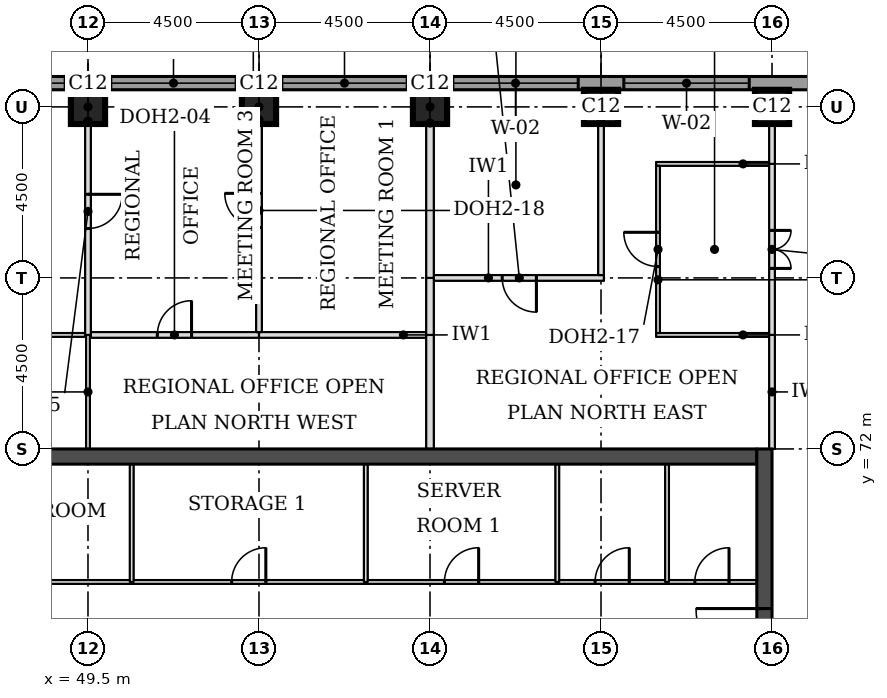
"""IFC4 building model, lengths in metres.
Left out: names, types, materials, properties, quantities, classifications, styles, units other than length and angle.
Written with IfcOpenShell. Run it as: python <this file> out.ifc"""

import sys

from ifc_helpers import new_model, si_unit, direction, frame, frame_2d, origin, origin_2d, place, context, subcontext, project, spatial, rectangle, extrude, element, fill, save


model = new_model("IFC4")
c1 = context("Model", 3, precision=1e-05, world=origin(), true_north=direction((0.0, 1.0)))
c2 = subcontext(c1, "Body", "Model", "MODEL_VIEW")
j1 = project(units=[si_unit("LENGTHUNIT", "METRE"), si_unit("PLANEANGLEUNIT", "RADIAN")], contexts=[c1])
p1 = place(None, origin())
s1 = spatial("IfcSite", under=j1, at=p1, CompositionType="ELEMENT")
p2 = place(p1, origin())
s2 = spatial("IfcBuilding", under=s1, at=p2, CompositionType="ELEMENT")
p3 = place(p2, frame((0.0, 0.0, 155.1)))
s3 = spatial("IfcBuildingStorey", under=s2, at=p3, CompositionType="ELEMENT", Elevation=155.1)
for number, where, z_axis, x_axis in (
    (1, (49.5, 81.0, 0.0), (0.0, 0.0, 1.0), (1.0, 0.0, 0.0)),
    (2, (54.0, 81.0, 0.0), (0.0, 0.0, 1.0), (1.0, 0.0, 0.0)),
    (3, (58.5, 81.0, 0.0), (0.0, 0.0, 1.0), (1.0, 0.0, 0.0)),
    (4, (63.0, 81.0, 0.0), (0.0, 0.0, 1.0), (1.0, 0.0, 0.0)),
    (5, (67.5, 81.0, 0.0), (0.0, 0.0, 1.0), (1.0, 0.0, 0.0)),
):
    element("IfcColumn", number, at=place(p3, frame(where, z_axis=z_axis, x_axis=x_axis)), inside=s3, PredefinedType="COLUMN", context=c2, shape_type="SweptSolid", body=[
        extrude(rectangle(XDim=0.9, YDim=0.9, at=origin_2d()), origin(), (0.0, 0.0, 1.0), 3.7),
    ])
p4 = place(p3, frame((45.4, 71.8, 0.0), z_axis=(0.0, 0.0, 1.0), x_axis=(1.0, 0.0, 0.0)))
e6 = element("IfcWall", 6, at=p4, inside=s3, PredefinedType="SHEAR", context=c2, shape_type="SweptSolid", body=[
    extrude(rectangle(XDim=21.7, YDim=0.4, at=frame_2d((10.85, 0.0))), origin(), (0.0, 0.0, 1.0), 3.7),
])
p5 = place(p3, frame((67.3, 49.5, 0.0), z_axis=(0.0, 0.0, 1.0), x_axis=(0.0, 1.0, 0.0)))
e7 = element("IfcWall", 7, at=p5, inside=s3, PredefinedType="SHEAR", context=c2, shape_type="SweptSolid", body=[
    extrude(rectangle(XDim=22.5, YDim=0.4, at=frame_2d((11.25, 0.0))), origin(), (0.0, 0.0, 1.0), 3.7),
])
p6 = place(p5, frame((4.2, 0.0, 0.0)))
e8 = element("IfcOpeningElement", 8, at=p6, cuts=e7, PredefinedType="OPENING", context=c2, shape_type="SweptSolid", body=[
    extrude(rectangle(XDim=1.8, YDim=2.1, at=frame_2d((0.9, 1.05))), frame((0.0, 0.21, 0.0), z_axis=(0.0, -1.0, 0.0), x_axis=(1.0, 0.0, 0.0)), (0.0, 0.0, 1.0), 0.42),
])
p7 = place(p5, frame((6.9, 0.0, 0.0)))
e9 = element("IfcOpeningElement", 9, at=p7, cuts=e7, PredefinedType="OPENING", context=c2, shape_type="SweptSolid", body=[
    extrude(rectangle(XDim=1.1, YDim=2.1, at=frame_2d((0.55, 1.05))), frame((0.0, 0.21, 0.0), z_axis=(0.0, -1.0, 0.0), x_axis=(1.0, 0.0, 0.0)), (0.0, 0.0, 1.0), 0.42),
])
p8 = place(p5, frame((13.6, 0.0, 0.0)))
e10 = element("IfcOpeningElement", 10, at=p8, cuts=e7, PredefinedType="OPENING", context=c2, shape_type="SweptSolid", body=[
    extrude(rectangle(XDim=1.1, YDim=2.1, at=frame_2d((0.55, 1.05))), frame((0.0, 0.21, 0.0), z_axis=(0.0, -1.0, 0.0), x_axis=(1.0, 0.0, 0.0)), (0.0, 0.0, 1.0), 0.42),
])
p9 = place(p5, frame((16.5, 0.0, 0.0)))
e11 = element("IfcOpeningElement", 11, at=p9, cuts=e7, PredefinedType="OPENING", context=c2, shape_type="SweptSolid", body=[
    extrude(rectangle(XDim=1.8, YDim=2.1, at=frame_2d((0.9, 1.05))), frame((0.0, 0.21, 0.0), z_axis=(0.0, -1.0, 0.0), x_axis=(1.0, 0.0, 0.0)), (0.0, 0.0, 1.0), 0.42),
])
p10 = place(p3, frame((72.331, 81.625, 0.0), z_axis=(0.0, 0.0, 1.0), x_axis=(-1.0, 0.0, 0.0)))
e12 = element("IfcWall", 12, at=p10, inside=s3, PredefinedType="STANDARD", context=c2, shape_type="SweptSolid", body=[
    extrude(rectangle(XDim=32.163, YDim=0.35, at=frame_2d((16.081, 0.0))), origin(), (0.0, 0.0, 1.0), 3.525),
])
p11 = place(p10, frame((5.431, 0.0, 0.9)))
e13 = element("IfcOpeningElement", 13, at=p11, cuts=e12, PredefinedType="OPENING", context=c2, shape_type="SweptSolid", body=[
    extrude(rectangle(XDim=3.3, YDim=1.9, at=frame_2d((1.65, 0.95))), frame((0.0, 0.185, 0.0), z_axis=(0.0, -1.0, 0.0), x_axis=(1.0, 0.0, 0.0)), (0.0, 0.0, 1.0), 0.37),
])
p12 = place(p10, frame((9.931, 0.0, 0.9)))
e14 = element("IfcOpeningElement", 14, at=p12, cuts=e12, PredefinedType="OPENING", context=c2, shape_type="SweptSolid", body=[
    extrude(rectangle(XDim=3.3, YDim=1.9, at=frame_2d((1.65, 0.95))), frame((0.0, 0.185, 0.0), z_axis=(0.0, -1.0, 0.0), x_axis=(1.0, 0.0, 0.0)), (0.0, 0.0, 1.0), 0.37),
])
p13 = place(p10, frame((14.431, 0.0, 0.9)))
e15 = element("IfcOpeningElement", 15, at=p13, cuts=e12, PredefinedType="OPENING", context=c2, shape_type="SweptSolid", body=[
    extrude(rectangle(XDim=3.3, YDim=1.9, at=frame_2d((1.65, 0.95))), frame((0.0, 0.185, 0.0), z_axis=(0.0, -1.0, 0.0), x_axis=(1.0, 0.0, 0.0)), (0.0, 0.0, 1.0), 0.37),
])
p14 = place(p10, frame((18.931, 0.0, 0.9)))
e16 = element("IfcOpeningElement", 16, at=p14, cuts=e12, PredefinedType="OPENING", context=c2, shape_type="SweptSolid", body=[
    extrude(rectangle(XDim=3.3, YDim=1.9, at=frame_2d((1.65, 0.95))), frame((0.0, 0.185, 0.0), z_axis=(0.0, -1.0, 0.0), x_axis=(1.0, 0.0, 0.0)), (0.0, 0.0, 1.0), 0.37),
])
p15 = place(p10, frame((23.431, 0.0, 0.9)))
e17 = element("IfcOpeningElement", 17, at=p15, cuts=e12, PredefinedType="OPENING", context=c2, shape_type="SweptSolid", body=[
    extrude(rectangle(XDim=3.3, YDim=1.9, at=frame_2d((1.65, 0.95))), frame((0.0, 0.185, 0.0), z_axis=(0.0, -1.0, 0.0), x_axis=(1.0, 0.0, 0.0)), (0.0, 0.0, 1.0), 0.37),
])
p16 = place(p3, frame((45.075, 75.0, 0.0), z_axis=(0.0, 0.0, 1.0), x_axis=(1.0, 0.0, 0.0)))
e18 = element("IfcWall", 18, at=p16, inside=s3, PredefinedType="PARTITIONING", context=c2, shape_type="SweptSolid", body=[
    extrude(rectangle(XDim=4.35, YDim=0.1, at=frame_2d((2.175, 0.0))), origin(), (0.0, 0.0, 1.0), 3.55),
])
p17 = place(p16, frame((1.7, 0.0, 0.0)))
e19 = element("IfcOpeningElement", 19, at=p17, cuts=e18, PredefinedType="OPENING", context=c2, shape_type="SweptSolid", body=[
    extrude(rectangle(XDim=0.9, YDim=2.1, at=frame_2d((0.45, 1.05))), frame((0.0, 0.06, 0.0), z_axis=(0.0, -1.0, 0.0), x_axis=(1.0, 0.0, 0.0)), (0.0, 0.0, 1.0), 0.12),
])
p18 = place(p3, frame((49.575, 75.0, 0.0), z_axis=(0.0, 0.0, 1.0), x_axis=(1.0, 0.0, 0.0)))
e20 = element("IfcWall", 20, at=p18, inside=s3, PredefinedType="PARTITIONING", context=c2, shape_type="SweptSolid", body=[
    extrude(rectangle(XDim=4.425, YDim=0.15, at=frame_2d((2.212, 0.0))), origin(), (0.0, 0.0, 1.0), 3.55),
])
p19 = place(p18, frame((1.75, 0.0, 0.0)))
e21 = element("IfcOpeningElement", 21, at=p19, cuts=e20, PredefinedType="OPENING", context=c2, shape_type="SweptSolid", body=[
    extrude(rectangle(XDim=0.9, YDim=2.1, at=frame_2d((0.45, 1.05))), frame((0.0, 0.085, 0.0), z_axis=(0.0, -1.0, 0.0), x_axis=(1.0, 0.0, 0.0)), (0.0, 0.0, 1.0), 0.17),
])
p20 = place(p3, frame((54.0, 75.0, 0.0), z_axis=(0.0, 0.0, 1.0), x_axis=(1.0, 0.0, 0.0)))
e22 = element("IfcWall", 22, at=p20, inside=s3, PredefinedType="PARTITIONING", context=c2, shape_type="SweptSolid", body=[
    extrude(rectangle(XDim=4.4, YDim=0.15, at=frame_2d((2.2, 0.0))), origin(), (0.0, 0.0, 1.0), 3.55),
])
p21 = place(p3, frame((64.45, 75.0, 0.0), z_axis=(0.0, 0.0, 1.0), x_axis=(1.0, 0.0, 0.0)))
e23 = element("IfcWall", 23, at=p21, inside=s3, PredefinedType="PARTITIONING", context=c2, shape_type="SweptSolid", body=[
    extrude(rectangle(XDim=2.975, YDim=0.1, at=frame_2d((1.488, 0.0))), origin(), (0.0, 0.0, 1.0), 3.55),
])
p22 = place(p3, frame((58.6, 76.5, 0.0), z_axis=(0.0, 0.0, 1.0), x_axis=(1.0, 0.0, 0.0)))
e24 = element("IfcWall", 24, at=p22, inside=s3, PredefinedType="PARTITIONING", context=c2, shape_type="SweptSolid", body=[
    extrude(rectangle(XDim=4.475, YDim=0.15, at=frame_2d((2.237, 0.0))), origin(), (0.0, 0.0, 1.0), 3.55),
])
p23 = place(p22, frame((1.8, 0.0, 0.0)))
e25 = element("IfcOpeningElement", 25, at=p23, cuts=e24, PredefinedType="OPENING", context=c2, shape_type="SweptSolid", body=[
    extrude(rectangle(XDim=0.9, YDim=2.1, at=frame_2d((0.45, 1.05))), frame((0.0, 0.085, 0.0), z_axis=(0.0, -1.0, 0.0), x_axis=(1.0, 0.0, 0.0)), (0.0, 0.0, 1.0), 0.17),
])
p24 = place(p3, frame((64.45, 79.5, 0.0), z_axis=(0.0, 0.0, 1.0), x_axis=(1.0, 0.0, 0.0)))
e26 = element("IfcWall", 26, at=p24, inside=s3, PredefinedType="PARTITIONING", context=c2, shape_type="SweptSolid", body=[
    extrude(rectangle(XDim=2.975, YDim=0.1, at=frame_2d((1.488, 0.0))), origin(), (0.0, 0.0, 1.0), 3.55),
])
p25 = place(p3, frame((49.5, 72.0, 0.0), z_axis=(0.0, 0.0, 1.0), x_axis=(0.0, 1.0, 0.0)))
e27 = element("IfcWall", 27, at=p25, inside=s3, PredefinedType="PARTITIONING", context=c2, shape_type="SweptSolid", body=[
    extrude(rectangle(XDim=3.0, YDim=0.1, at=frame_2d((1.5, 0.0))), origin(), (0.0, 0.0, 1.0), 3.55),
])
p26 = place(p3, frame((58.5, 72.0, 0.0), z_axis=(0.0, 0.0, 1.0), x_axis=(0.0, 1.0, 0.0)))
e28 = element("IfcWall", 28, at=p26, inside=s3, PredefinedType="PARTITIONING", context=c2, shape_type="SweptSolid", body=[
    extrude(rectangle(XDim=3.0, YDim=0.2, at=frame_2d((1.5, 0.0))), origin(), (0.0, 0.0, 1.0), 3.55),
])
p27 = place(p3, frame((67.5, 72.0, 0.0), z_axis=(0.0, 0.0, 1.0), x_axis=(0.0, 1.0, 0.0)))
e29 = element("IfcWall", 29, at=p27, inside=s3, PredefinedType="PARTITIONING", context=c2, shape_type="SweptSolid", body=[
    extrude(rectangle(XDim=3.0, YDim=0.15, at=frame_2d((1.5, 0.0))), origin(), (0.0, 0.0, 1.0), 3.022),
])
p28 = place(p3, frame((49.5, 75.0, 0.0), z_axis=(0.0, 0.0, 1.0), x_axis=(0.0, 1.0, 0.0)))
e30 = element("IfcWall", 30, at=p28, inside=s3, PredefinedType="PARTITIONING", context=c2, shape_type="SweptSolid", body=[
    extrude(rectangle(XDim=6.45, YDim=0.15, at=frame_2d((3.225, 0.0))), origin(), (0.0, 0.0, 1.0), 3.55),
])
p29 = place(p28, frame((2.8, 0.0, 0.0)))
e31 = element("IfcOpeningElement", 31, at=p29, cuts=e30, PredefinedType="OPENING", context=c2, shape_type="SweptSolid", body=[
    extrude(rectangle(XDim=0.9, YDim=2.1, at=frame_2d((0.45, 1.05))), frame((0.0, 0.085, 0.0), z_axis=(0.0, -1.0, 0.0), x_axis=(1.0, 0.0, 0.0)), (0.0, 0.0, 1.0), 0.17),
])
p30 = place(p3, frame((58.5, 75.0, 0.0), z_axis=(0.0, 0.0, 1.0), x_axis=(0.0, 1.0, 0.0)))
e32 = element("IfcWall", 32, at=p30, inside=s3, PredefinedType="PARTITIONING", context=c2, shape_type="SweptSolid", body=[
    extrude(rectangle(XDim=1.5, YDim=0.2, at=frame_2d((0.75, 0.0))), origin(), (0.0, 0.0, 1.0), 3.55),
])
p31 = place(p3, frame((67.5, 75.0, 0.0), z_axis=(0.0, 0.0, 1.0), x_axis=(0.0, 1.0, 0.0)))
e33 = element("IfcWall", 33, at=p31, inside=s3, PredefinedType="PARTITIONING", context=c2, shape_type="SweptSolid", body=[
    extrude(rectangle(XDim=4.5, YDim=0.15, at=frame_2d((2.25, 0.0))), origin(), (0.0, 0.0, 1.0), 3.022),
])
p32 = place(p31, frame((1.75, 0.0, 0.0)))
e34 = element("IfcOpeningElement", 34, at=p32, cuts=e33, PredefinedType="OPENING", context=c2, shape_type="SweptSolid", body=[
    extrude(rectangle(XDim=1.0, YDim=2.1, at=frame_2d((0.5, 1.05))), frame((0.0, 0.085, 0.0), z_axis=(0.0, -1.0, 0.0), x_axis=(1.0, 0.0, 0.0)), (0.0, 0.0, 1.0), 0.17),
])
p33 = place(p3, frame((64.5, 75.05, 0.0), z_axis=(0.0, 0.0, 1.0), x_axis=(0.0, 1.0, 0.0)))
e35 = element("IfcWall", 35, at=p33, inside=s3, PredefinedType="PARTITIONING", context=c2, shape_type="SweptSolid", body=[
    extrude(rectangle(XDim=4.4, YDim=0.1, at=frame_2d((2.2, 0.0))), origin(), (0.0, 0.0, 1.0), 3.55),
])
p34 = place(p33, frame((1.75, 0.0, 0.0)))
e36 = element("IfcOpeningElement", 36, at=p34, cuts=e35, PredefinedType="OPENING", context=c2, shape_type="SweptSolid", body=[
    extrude(rectangle(XDim=0.9, YDim=2.1, at=frame_2d((0.45, 1.05))), frame((0.0, 0.06, 0.0), z_axis=(0.0, -1.0, 0.0), x_axis=(1.0, 0.0, 0.0)), (0.0, 0.0, 1.0), 0.12),
])
p35 = place(p3, frame((54.0, 75.075, 0.0), z_axis=(0.0, 0.0, 1.0), x_axis=(0.0, 1.0, 0.0)))
e37 = element("IfcWall", 37, at=p35, inside=s3, PredefinedType="PARTITIONING", context=c2, shape_type="SweptSolid", body=[
    extrude(rectangle(XDim=6.375, YDim=0.15, at=frame_2d((3.188, 0.0))), origin(), (0.0, 0.0, 1.0), 3.55),
])
p36 = place(p35, frame((2.75, 0.0, 0.0)))
e38 = element("IfcOpeningElement", 38, at=p36, cuts=e37, PredefinedType="OPENING", context=c2, shape_type="SweptSolid", body=[
    extrude(rectangle(XDim=0.9, YDim=2.1, at=frame_2d((0.45, 1.05))), frame((0.0, 0.085, 0.0), z_axis=(0.0, -1.0, 0.0), x_axis=(1.0, 0.0, 0.0)), (0.0, 0.0, 1.0), 0.17),
])
p37 = place(p3, frame((58.5, 76.5, 0.0), z_axis=(0.0, 0.0, 1.0), x_axis=(0.0, 1.0, 0.0)))
e39 = element("IfcWall", 39, at=p37, inside=s3, PredefinedType="PARTITIONING", context=c2, shape_type="SweptSolid", body=[
    extrude(rectangle(XDim=4.95, YDim=0.2, at=frame_2d((2.475, 0.0))), origin(), (0.0, 0.0, 1.0), 3.55),
])
p38 = place(p3, frame((63.0, 76.575, 0.0), z_axis=(0.0, 0.0, 1.0), x_axis=(0.0, 1.0, 0.0)))
e40 = element("IfcWall", 40, at=p38, inside=s3, PredefinedType="PARTITIONING", context=c2, shape_type="SweptSolid", body=[
    extrude(rectangle(XDim=4.875, YDim=0.15, at=frame_2d((2.438, 0.0))), origin(), (0.0, 0.0, 1.0), 3.55),
])
p39 = place(p3, frame((67.5, 79.5, 0.0), z_axis=(0.0, 0.0, 1.0), x_axis=(0.0, 1.0, 0.0)))
e41 = element("IfcWall", 41, at=p39, inside=s3, PredefinedType="PARTITIONING", context=c2, shape_type="SweptSolid", body=[
    extrude(rectangle(XDim=1.95, YDim=0.15, at=frame_2d((0.975, 0.0))), origin(), (0.0, 0.0, 1.0), 3.022),
])
p40 = place(p3, frame((45.4, 68.5, 0.0), z_axis=(0.0, 0.0, 1.0), x_axis=(1.0, 0.0, 0.0)))
e42 = element("IfcWall", 42, at=p40, inside=s3, PredefinedType="PARTITIONING", context=c2, shape_type="SweptSolid", body=[
    extrude(rectangle(XDim=21.7, YDim=0.1, at=frame_2d((10.85, 0.0))), origin(), (0.0, 0.0, 1.0), 3.55),
])
p41 = place(p40, frame((20.069, 0.0, 0.0)))
e43 = element("IfcOpeningElement", 43, at=p41, cuts=e42, PredefinedType="OPENING", context=c2, shape_type="SweptSolid", body=[
    extrude(rectangle(XDim=0.9, YDim=2.1, at=frame_2d((0.45, 1.05))), frame((0.0, 0.06, 0.0), z_axis=(0.0, -1.0, 0.0), x_axis=(1.0, 0.0, 0.0)), (0.0, 0.0, 1.0), 0.12),
])
p42 = place(p40, frame((17.444, 0.0, 0.0)))
e44 = element("IfcOpeningElement", 44, at=p42, cuts=e42, PredefinedType="OPENING", context=c2, shape_type="SweptSolid", body=[
    extrude(rectangle(XDim=0.9, YDim=2.1, at=frame_2d((0.45, 1.05))), frame((0.0, 0.06, 0.0), z_axis=(0.0, -1.0, 0.0), x_axis=(1.0, 0.0, 0.0)), (0.0, 0.0, 1.0), 0.12),
])
p43 = place(p40, frame((2.175, 0.0, 0.0)))
e45 = element("IfcOpeningElement", 45, at=p43, cuts=e42, PredefinedType="OPENING", context=c2, shape_type="SweptSolid", body=[
    extrude(rectangle(XDim=0.9, YDim=2.1, at=frame_2d((0.45, 1.05))), frame((0.0, 0.06, 0.0), z_axis=(0.0, -1.0, 0.0), x_axis=(1.0, 0.0, 0.0)), (0.0, 0.0, 1.0), 0.12),
])
p44 = place(p40, frame((13.48, 0.0, 0.0)))
e46 = element("IfcOpeningElement", 46, at=p44, cuts=e42, PredefinedType="OPENING", context=c2, shape_type="SweptSolid", body=[
    extrude(rectangle(XDim=0.9, YDim=2.1, at=frame_2d((0.45, 1.05))), frame((0.0, 0.06, 0.0), z_axis=(0.0, -1.0, 0.0), x_axis=(1.0, 0.0, 0.0)), (0.0, 0.0, 1.0), 0.12),
])
p45 = place(p40, frame((7.88, 0.0, 0.0)))
e47 = element("IfcOpeningElement", 47, at=p45, cuts=e42, PredefinedType="OPENING", context=c2, shape_type="SweptSolid", body=[
    extrude(rectangle(XDim=0.9, YDim=2.1, at=frame_2d((0.45, 1.05))), frame((0.0, 0.06, 0.0), z_axis=(0.0, -1.0, 0.0), x_axis=(1.0, 0.0, 0.0)), (0.0, 0.0, 1.0), 0.12),
])
for number, where, z_axis, x_axis in (
    (48, (50.65, 68.5, 0.0), (0.0, 0.0, 1.0), (0.0, 1.0, 0.0)),
    (49, (56.81, 68.5, 0.0), (0.0, 0.0, 1.0), (0.0, 1.0, 0.0)),
    (50, (61.85, 68.5, 0.0), (0.0, 0.0, 1.0), (0.0, 1.0, 0.0)),
    (51, (64.738, 68.5, 0.0), (0.0, 0.0, 1.0), (0.0, 1.0, 0.0)),
):
    element("IfcWall", number, at=place(p3, frame(where, z_axis=z_axis, x_axis=x_axis)), inside=s3, PredefinedType="PARTITIONING", context=c2, shape_type="SweptSolid", body=[
        extrude(rectangle(XDim=3.1, YDim=0.1, at=frame_2d((1.55, 0.0))), origin(), (0.0, 0.0, 1.0), 3.55),
    ])
p46 = place(p11, origin())
e52 = element("IfcWindow", 52, at=p46, inside=s3, PartitioningType="SINGLE_PANEL", PredefinedType="WINDOW", context=c2, shape_type="SweptSolid", body=[
    extrude(rectangle(XDim=3.3, YDim=1.9, at=frame_2d((1.65, 0.95))), frame((0.0, 0.085, 0.0), z_axis=(0.0, -1.0, 0.0), x_axis=(1.0, 0.0, 0.0)), (0.0, 0.0, 1.0), 0.06),
])
fill(e13, e52)
p47 = place(p12, origin())
e53 = element("IfcWindow", 53, at=p47, inside=s3, PartitioningType="SINGLE_PANEL", PredefinedType="WINDOW", context=c2, shape_type="SweptSolid", body=[
    extrude(rectangle(XDim=3.3, YDim=1.9, at=frame_2d((1.65, 0.95))), frame((0.0, 0.085, 0.0), z_axis=(0.0, -1.0, 0.0), x_axis=(1.0, 0.0, 0.0)), (0.0, 0.0, 1.0), 0.06),
])
fill(e14, e53)
p48 = place(p13, origin())
e54 = element("IfcWindow", 54, at=p48, inside=s3, PartitioningType="SINGLE_PANEL", PredefinedType="WINDOW", context=c2, shape_type="SweptSolid", body=[
    extrude(rectangle(XDim=3.3, YDim=1.9, at=frame_2d((1.65, 0.95))), frame((0.0, 0.085, 0.0), z_axis=(0.0, -1.0, 0.0), x_axis=(1.0, 0.0, 0.0)), (0.0, 0.0, 1.0), 0.06),
])
fill(e15, e54)
p49 = place(p14, origin())
e55 = element("IfcWindow", 55, at=p49, inside=s3, PartitioningType="SINGLE_PANEL", PredefinedType="WINDOW", context=c2, shape_type="SweptSolid", body=[
    extrude(rectangle(XDim=3.3, YDim=1.9, at=frame_2d((1.65, 0.95))), frame((0.0, 0.085, 0.0), z_axis=(0.0, -1.0, 0.0), x_axis=(1.0, 0.0, 0.0)), (0.0, 0.0, 1.0), 0.06),
])
fill(e16, e55)
p50 = place(p15, origin())
e56 = element("IfcWindow", 56, at=p50, inside=s3, PartitioningType="SINGLE_PANEL", PredefinedType="WINDOW", context=c2, shape_type="SweptSolid", body=[
    extrude(rectangle(XDim=3.3, YDim=1.9, at=frame_2d((1.65, 0.95))), frame((0.0, 0.085, 0.0), z_axis=(0.0, -1.0, 0.0), x_axis=(1.0, 0.0, 0.0)), (0.0, 0.0, 1.0), 0.06),
])
fill(e17, e56)
p51 = place(p29, frame((0.9, 0.0, 0.0), z_axis=(0.0, 0.0, 1.0), x_axis=(-1.0, 0.0, 0.0)))
e57 = element("IfcDoor", 57, at=p51, inside=s3, OperationType="SINGLE_SWING_LEFT", PredefinedType="DOOR", context=c2, shape_type="SweptSolid", body=[
    extrude(rectangle(XDim=0.9, YDim=2.1, at=frame_2d((0.45, 1.05))), frame((0.0, 0.025, 0.0), z_axis=(0.0, -1.0, 0.0), x_axis=(1.0, 0.0, 0.0)), (0.0, 0.0, 1.0), 0.05),
])
fill(e31, e57)
p52 = place(p36, origin())
e58 = element("IfcDoor", 58, at=p52, inside=s3, OperationType="SINGLE_SWING_RIGHT", PredefinedType="DOOR", context=c2, shape_type="SweptSolid", body=[
    extrude(rectangle(XDim=0.9, YDim=2.1, at=frame_2d((0.45, 1.05))), frame((0.0, 0.025, 0.0), z_axis=(0.0, -1.0, 0.0), x_axis=(1.0, 0.0, 0.0)), (0.0, 0.0, 1.0), 0.05),
])
fill(e38, e58)
p53 = place(p19, origin())
e59 = element("IfcDoor", 59, at=p53, inside=s3, OperationType="SINGLE_SWING_RIGHT", PredefinedType="DOOR", context=c2, shape_type="SweptSolid", body=[
    extrude(rectangle(XDim=0.9, YDim=2.1, at=frame_2d((0.45, 1.05))), frame((0.0, 0.025, 0.0), z_axis=(0.0, -1.0, 0.0), x_axis=(1.0, 0.0, 0.0)), (0.0, 0.0, 1.0), 0.05),
])
fill(e21, e59)
p54 = place(p32, frame((1.0, 0.0, 0.0), z_axis=(0.0, 0.0, 1.0), x_axis=(-1.0, 0.0, 0.0)))
e60 = element("IfcDoor", 60, at=p54, inside=s3, OperationType="DOUBLE_DOOR_SINGLE_SWING", PredefinedType="DOOR", context=c2, shape_type="SweptSolid", body=[
    extrude(rectangle(XDim=1.0, YDim=2.1, at=frame_2d((0.5, 1.05))), frame((0.0, 0.025, 0.0), z_axis=(0.0, -1.0, 0.0), x_axis=(1.0, 0.0, 0.0)), (0.0, 0.0, 1.0), 0.05),
])
fill(e34, e60)
p55 = place(p34, origin())
e61 = element("IfcDoor", 61, at=p55, inside=s3, OperationType="SINGLE_SWING_RIGHT", PredefinedType="DOOR", context=c2, shape_type="SweptSolid", body=[
    extrude(rectangle(XDim=0.9, YDim=2.1, at=frame_2d((0.45, 1.05))), frame((0.0, 0.025, 0.0), z_axis=(0.0, -1.0, 0.0), x_axis=(1.0, 0.0, 0.0)), (0.0, 0.0, 1.0), 0.05),
])
fill(e36, e61)
p56 = place(p23, frame((0.9, 0.0, 0.0), z_axis=(0.0, 0.0, 1.0), x_axis=(-1.0, 0.0, 0.0)))
e62 = element("IfcDoor", 62, at=p56, inside=s3, OperationType="SINGLE_SWING_LEFT", PredefinedType="DOOR", context=c2, shape_type="SweptSolid", body=[
    extrude(rectangle(XDim=0.9, YDim=2.1, at=frame_2d((0.45, 1.05))), frame((0.0, 0.025, 0.0), z_axis=(0.0, -1.0, 0.0), x_axis=(1.0, 0.0, 0.0)), (0.0, 0.0, 1.0), 0.05),
])
fill(e25, e62)
p57 = place(p9, origin())
e63 = element("IfcDoor", 63, at=p57, inside=s3, OperationType="SINGLE_SWING_RIGHT", PredefinedType="DOOR", context=c2, shape_type="SweptSolid", body=[
    extrude(rectangle(XDim=1.8, YDim=2.1, at=frame_2d((0.9, 1.05))), frame((0.0, 0.025, 0.0), z_axis=(0.0, -1.0, 0.0), x_axis=(1.0, 0.0, 0.0)), (0.0, 0.0, 1.0), 0.05),
])
fill(e11, e63)
p58 = place(p41, origin())
e64 = element("IfcDoor", 64, at=p58, inside=s3, OperationType="SINGLE_SWING_RIGHT", PredefinedType="DOOR", context=c2, shape_type="SweptSolid", body=[
    extrude(rectangle(XDim=0.9, YDim=2.1, at=frame_2d((0.45, 1.05))), frame((0.0, 0.025, 0.0), z_axis=(0.0, -1.0, 0.0), x_axis=(1.0, 0.0, 0.0)), (0.0, 0.0, 1.0), 0.05),
])
fill(e43, e64)
p59 = place(p42, origin())
e65 = element("IfcDoor", 65, at=p59, inside=s3, OperationType="SINGLE_SWING_RIGHT", PredefinedType="DOOR", context=c2, shape_type="SweptSolid", body=[
    extrude(rectangle(XDim=0.9, YDim=2.1, at=frame_2d((0.45, 1.05))), frame((0.0, 0.025, 0.0), z_axis=(0.0, -1.0, 0.0), x_axis=(1.0, 0.0, 0.0)), (0.0, 0.0, 1.0), 0.05),
])
fill(e44, e65)
p60 = place(p44, origin())
e66 = element("IfcDoor", 66, at=p60, inside=s3, OperationType="SINGLE_SWING_RIGHT", PredefinedType="DOOR", context=c2, shape_type="SweptSolid", body=[
    extrude(rectangle(XDim=0.9, YDim=2.1, at=frame_2d((0.45, 1.05))), frame((0.0, 0.025, 0.0), z_axis=(0.0, -1.0, 0.0), x_axis=(1.0, 0.0, 0.0)), (0.0, 0.0, 1.0), 0.05),
])
fill(e46, e66)
p61 = place(p45, origin())
e67 = element("IfcDoor", 67, at=p61, inside=s3, OperationType="SINGLE_SWING_RIGHT", PredefinedType="DOOR", context=c2, shape_type="SweptSolid", body=[
    extrude(rectangle(XDim=0.9, YDim=2.1, at=frame_2d((0.45, 1.05))), frame((0.0, 0.025, 0.0), z_axis=(0.0, -1.0, 0.0), x_axis=(1.0, 0.0, 0.0)), (0.0, 0.0, 1.0), 0.05),
])
fill(e47, e67)
save(model, sys.argv[1])
